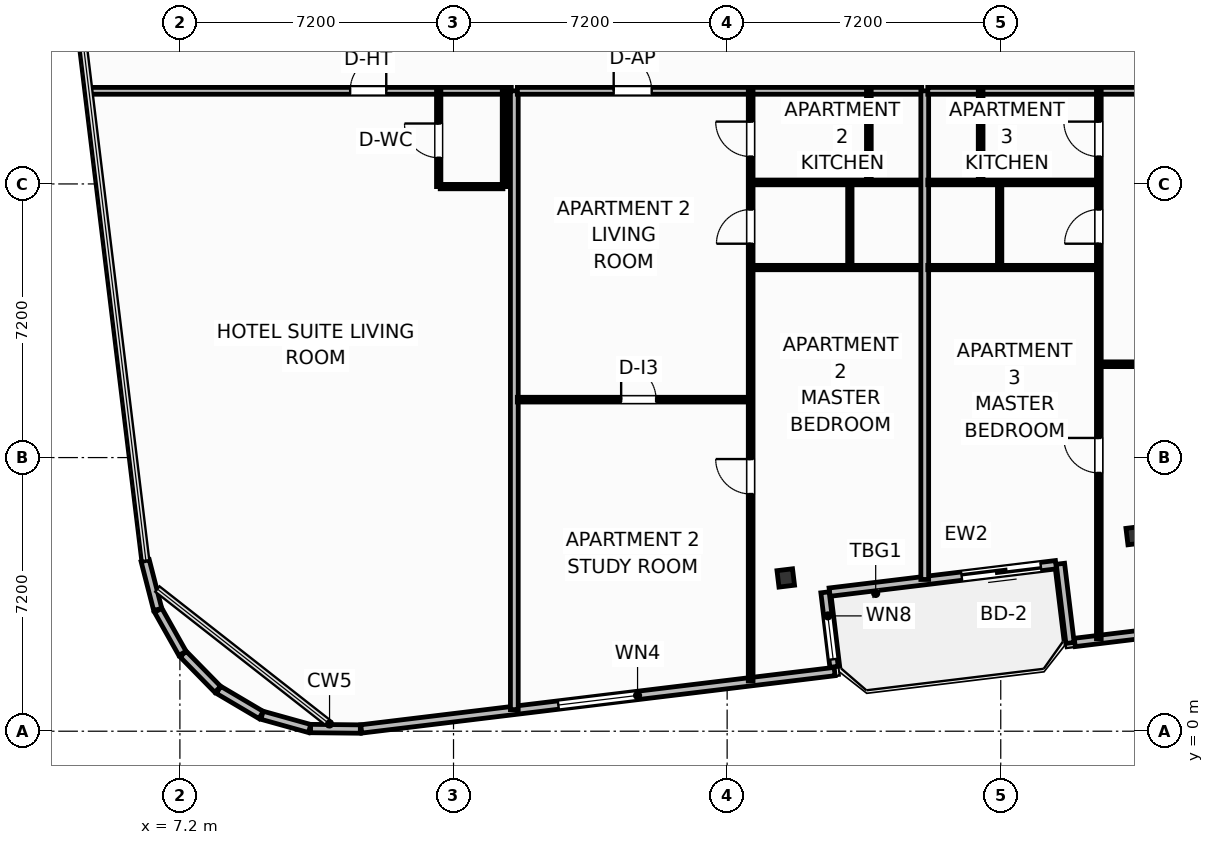
"""IFC4 building model, lengths in metres.
Left out: names, types, materials, properties, quantities, classifications, styles, units other than length and angle.
Written with IfcOpenShell. Run it as: python <this file> out.ifc"""

import sys

from ifc_helpers import new_model, si_unit, direction, frame, frame_2d, origin, origin_2d, place, context, subcontext, project, spatial, rectangle, i_section, extrude, element, fill, save


model = new_model("IFC4")
c1 = context("Model", 3, precision=1e-05, world=origin(), true_north=direction((0.0, 1.0)))
c2 = subcontext(c1, "Body", "Model", "MODEL_VIEW")
j1 = project(units=[si_unit("LENGTHUNIT", "METRE"), si_unit("PLANEANGLEUNIT", "RADIAN")], contexts=[c1])
p1 = place(None, origin())
s1 = spatial("IfcSite", under=j1, at=p1, CompositionType="ELEMENT")
p2 = place(p1, origin())
s2 = spatial("IfcBuilding", under=s1, at=p2, CompositionType="ELEMENT")
p3 = place(p2, frame((0.0, 0.0, 167.2)))
s3 = spatial("IfcBuildingStorey", under=s2, at=p3, CompositionType="ELEMENT", Elevation=167.2)
for number, where, z_axis, x_axis in (
    (1, (23.143, 4.033, 0.0), (0.0, 0.0, 1.0), (0.993, 0.12, 0.0)),
    (2, (32.325, 5.146, 0.0), (0.0, 0.0, 1.0), (0.993, 0.12, 0.0)),
):
    element("IfcColumn", number, at=place(p3, frame(where, z_axis=z_axis, x_axis=x_axis)), inside=s3, PredefinedType="COLUMN", context=c2, shape_type="SweptSolid", body=[
        extrude(i_section(OverallWidth=0.412, OverallDepth=0.435, WebThickness=0.036, FlangeThickness=0.057, FilletRadius=0.025, at=origin_2d()), origin(), (0.0, 0.0, 1.0), 3.7),
    ])
p4 = place(p3, frame((30.252, 4.381, 0.0), z_axis=(0.0, 0.0, 1.0), x_axis=(-0.992735402148, -0.120318000826, 0.0)))
e3 = element("IfcWall", 3, at=p4, inside=s3, PredefinedType="SOLIDWALL", context=c2, shape_type="SweptSolid", body=[
    extrude(rectangle(XDim=6.0, YDim=0.22, at=frame_2d((3.0, 0.0))), origin(), (0.0, 0.0, 1.0), 2.73),
])
p5 = place(p4, frame((0.4, 0.0, 0.0)))
e4 = element("IfcOpeningElement", 4, at=p5, cuts=e3, PredefinedType="OPENING", context=c2, shape_type="SweptSolid", body=[
    extrude(rectangle(XDim=2.1, YDim=2.3, at=frame_2d((1.05, 1.15))), frame((0.0, 0.12, 0.0), z_axis=(0.0, -1.0, 0.0), x_axis=(1.0, 0.0, 0.0)), (0.0, 0.0, 1.0), 0.24),
])
p6 = place(p3, frame((6.286, 4.488, 0.0), z_axis=(0.0, 0.0, 1.0), x_axis=(0.248942347653, -0.968518305219, 0.0)))
e5 = element("IfcWall", 5, at=p6, inside=s3, PredefinedType="SOLIDWALL", context=c2, shape_type="SweptSolid", body=[
    extrude(rectangle(XDim=1.326, YDim=0.22, at=frame_2d((0.663, 0.0))), origin(), (0.0, 0.0, 1.0), 2.73),
])
for number, where, z_axis, x_axis in (
    (6, (6.629, 3.182, 0.0), (0.0, 0.0, 1.0), (0.491, -0.871, 0.0)),
    (7, (7.285, 2.031, 0.0), (0.0, 0.0, 1.0), (0.7, -0.714, 0.0)),
    (8, (8.217, 1.089, 0.0), (0.0, 0.0, 1.0), (0.861, -0.509, 0.0)),
):
    element("IfcWall", number, at=place(p3, frame(where, z_axis=z_axis, x_axis=x_axis)), inside=s3, PredefinedType="SOLIDWALL", context=c2, shape_type="SweptSolid", body=[
        extrude(rectangle(XDim=1.301, YDim=0.22, at=frame_2d((0.65, 0.0))), origin(), (0.0, 0.0, 1.0), 2.73),
    ])
p7 = place(p3, frame((9.361, 0.42, 0.0), z_axis=(0.0, 0.0, 1.0), x_axis=(0.963218895288, -0.268717992997, 0.0)))
e9 = element("IfcWall", 9, at=p7, inside=s3, PredefinedType="SOLIDWALL", context=c2, shape_type="SweptSolid", body=[
    extrude(rectangle(XDim=1.301, YDim=0.22, at=frame_2d((0.65, 0.0))), origin(), (0.0, 0.0, 1.0), 2.73),
])
p8 = place(p3, frame((10.639, 0.07, 0.0), z_axis=(0.0, 0.0, 1.0), x_axis=(0.999947377741, -0.010258740119, 0.0)))
e10 = element("IfcWall", 10, at=p8, inside=s3, PredefinedType="SOLIDWALL", context=c2, shape_type="SweptSolid", body=[
    extrude(rectangle(XDim=1.309, YDim=0.22, at=frame_2d((0.654, 0.0))), origin(), (0.0, 0.0, 1.0), 2.73),
])
p9 = place(p3, frame((11.972, 0.06, 0.0), z_axis=(0.0, 0.0, 1.0), x_axis=(0.992732021049, 0.120345894751, 0.0)))
e11 = element("IfcWall", 11, at=p9, inside=s3, PredefinedType="SOLIDWALL", context=c2, shape_type="SweptSolid", body=[
    extrude(rectangle(XDim=12.547, YDim=0.22, at=frame_2d((6.274, 0.0))), origin(), (0.0, 0.0, 1.0), 2.73),
])
p10 = place(p9, frame((5.224, 0.0, 0.8)))
e12 = element("IfcOpeningElement", 12, at=p10, cuts=e11, PredefinedType="OPENING", context=c2, shape_type="SweptSolid", body=[
    extrude(rectangle(XDim=2.1, YDim=1.75, at=frame_2d((1.05, 0.875))), frame((0.0, 0.12, 0.0), z_axis=(0.0, -1.0, 0.0), x_axis=(1.0, 0.0, 0.0)), (0.0, 0.0, 1.0), 0.24),
])
p11 = place(p3, frame((24.413, 1.694, 0.0), z_axis=(0.0, 0.0, 1.0), x_axis=(-0.120290754542, 0.992738703976, 0.0)))
e13 = element("IfcWall", 13, at=p11, inside=s3, PredefinedType="SOLIDWALL", context=c2, shape_type="SweptSolid", body=[
    extrude(rectangle(XDim=1.975, YDim=0.22, at=frame_2d((0.987, 0.0))), origin(), (0.0, 0.0, 1.0), 2.73),
])
p12 = place(p11, frame((0.2, 0.0, 0.8)))
e14 = element("IfcOpeningElement", 14, at=p12, cuts=e13, PredefinedType="OPENING", context=c2, shape_type="SweptSolid", body=[
    extrude(rectangle(XDim=1.15, YDim=1.4, at=frame_2d((0.575, 0.7))), frame((0.0, 0.12, 0.0), z_axis=(0.0, -1.0, 0.0), x_axis=(1.0, 0.0, 0.0)), (0.0, 0.0, 1.0), 0.24),
])
p13 = place(p3, frame((30.37, 4.406, 0.0), z_axis=(0.0, 0.0, 1.0), x_axis=(0.120327895535, -0.992734202874, 0.0)))
e15 = element("IfcWall", 15, at=p13, inside=s3, PredefinedType="SOLIDWALL", context=c2, shape_type="SweptSolid", body=[
    extrude(rectangle(XDim=2.1, YDim=0.22, at=frame_2d((1.05, 0.0))), origin(), (0.0, 0.0, 1.0), 2.73),
])
p14 = place(p3, frame((30.747, 2.336, 0.0), z_axis=(0.0, 0.0, 1.0), x_axis=(0.992731032022, 0.120354052946, 0.0)))
e16 = element("IfcWall", 16, at=p14, inside=s3, PredefinedType="SOLIDWALL", context=c2, shape_type="SweptSolid", body=[
    extrude(rectangle(XDim=8.035, YDim=0.22, at=frame_2d((4.018, 0.0))), origin(), (0.0, 0.0, 1.0), 2.73),
])
p15 = place(p14, frame((2.968, 0.0, 0.8)))
e17 = element("IfcOpeningElement", 17, at=p15, cuts=e16, PredefinedType="OPENING", context=c2, shape_type="SweptSolid", body=[
    extrude(rectangle(XDim=2.1, YDim=1.75, at=frame_2d((1.05, 0.875))), frame((0.0, 0.12, 0.0), z_axis=(0.0, -1.0, 0.0), x_axis=(1.0, 0.0, 0.0)), (0.0, 0.0, 1.0), 0.24),
])
p16 = place(p3, frame((4.847, 16.85, 0.0), z_axis=(0.0, 0.0, 1.0), x_axis=(1.0, 0.0, 0.0)))
e18 = element("IfcWall", 18, at=p16, inside=s3, PredefinedType="PARTITIONING", context=c2, shape_type="SweptSolid", body=[
    extrude(rectangle(XDim=11.073, YDim=0.18, at=frame_2d((5.537, 0.0))), origin(), (0.0, 0.0, 1.0), 3.45),
])
p17 = place(p16, frame((6.833, 0.0, 0.0)))
e19 = element("IfcOpeningElement", 19, at=p17, cuts=e18, PredefinedType="OPENING", context=c2, shape_type="SweptSolid", body=[
    extrude(rectangle(XDim=0.95, YDim=2.15, at=frame_2d((0.475, 1.075))), frame((0.0, 0.1, 0.0), z_axis=(0.0, -1.0, 0.0), x_axis=(1.0, 0.0, 0.0)), (0.0, 0.0, 1.0), 0.2),
])
p18 = place(p3, frame((14.05, 14.33, 0.0), z_axis=(0.0, 0.0, 1.0), x_axis=(1.0, 0.0, 0.0)))
e20 = element("IfcWall", 20, at=p18, inside=s3, PredefinedType="PARTITIONING", context=c2, shape_type="SweptSolid", body=[
    extrude(rectangle(XDim=1.65, YDim=0.115, at=frame_2d((0.825, 0.0))), origin(), (0.0, 0.0, 1.0), 3.45),
])
p19 = place(p3, frame((14.01, 14.33, 0.0), z_axis=(0.0, 0.0, 1.0), x_axis=(0.0, 1.0, 0.0)))
e21 = element("IfcWall", 21, at=p19, inside=s3, PredefinedType="PARTITIONING", context=c2, shape_type="SweptSolid", body=[
    extrude(rectangle(XDim=2.52, YDim=0.115, at=frame_2d((1.26, 0.0))), origin(), (0.0, 0.0, 1.0), 3.45),
])
p20 = place(p19, frame((0.76, 0.0, 0.0)))
e22 = element("IfcOpeningElement", 22, at=p20, cuts=e21, PredefinedType="OPENING", context=c2, shape_type="SweptSolid", body=[
    extrude(rectangle(XDim=0.9, YDim=2.05, at=frame_2d((0.45, 1.025))), frame((0.0, 0.067, 0.0), z_axis=(0.0, -1.0, 0.0), x_axis=(1.0, 0.0, 0.0)), (0.0, 0.0, 1.0), 0.135),
])
p21 = place(p3, frame((15.74, 14.33, 0.0), z_axis=(0.0, 0.0, 1.0), x_axis=(0.0, 1.0, 0.0)))
e23 = element("IfcWall", 23, at=p21, inside=s3, PredefinedType="PARTITIONING", context=c2, shape_type="SweptSolid", body=[
    extrude(rectangle(XDim=2.52, YDim=0.115, at=frame_2d((1.26, 0.0))), origin(), (0.0, 0.0, 1.0), 3.45),
])
p22 = place(p3, frame((16.0, 0.568, 0.0), z_axis=(0.0, 0.0, 1.0), x_axis=(0.0, 1.0, 0.0)))
e24 = element("IfcWall", 24, at=p22, inside=s3, PredefinedType="PARTITIONING", context=c2, shape_type="SweptSolid", body=[
    extrude(rectangle(XDim=16.282, YDim=0.205, at=frame_2d((8.141, 0.0))), origin(), (0.0, 0.0, 1.0), 3.45),
])
p23 = place(p3, frame((16.08, 8.724, 0.0), z_axis=(0.0, 0.0, 1.0), x_axis=(1.0, 0.0, 0.0)))
e25 = element("IfcWall", 25, at=p23, inside=s3, PredefinedType="PARTITIONING", context=c2, shape_type="SweptSolid", body=[
    extrude(rectangle(XDim=6.069, YDim=0.125, at=frame_2d((3.035, 0.0))), origin(), (0.0, 0.0, 1.0), 3.45),
])
p24 = place(p23, frame((2.731, 0.0, 0.0)))
e26 = element("IfcOpeningElement", 26, at=p24, cuts=e25, PredefinedType="OPENING", context=c2, shape_type="SweptSolid", body=[
    extrude(rectangle(XDim=0.92, YDim=2.05, at=frame_2d((0.46, 1.025))), frame((0.0, 0.073, 0.0), z_axis=(0.0, -1.0, 0.0), x_axis=(1.0, 0.0, 0.0)), (0.0, 0.0, 1.0), 0.145),
])
p25 = place(p3, frame((16.08, 16.85, 0.0), z_axis=(0.0, 0.0, 1.0), x_axis=(1.0, 0.0, 0.0)))
e27 = element("IfcWall", 27, at=p25, inside=s3, PredefinedType="PARTITIONING", context=c2, shape_type="SweptSolid", body=[
    extrude(rectangle(XDim=10.64, YDim=0.18, at=frame_2d((5.32, 0.0))), origin(), (0.0, 0.0, 1.0), 3.45),
])
p26 = place(p25, frame((2.535, 0.0, 0.0)))
e28 = element("IfcOpeningElement", 28, at=p26, cuts=e27, PredefinedType="OPENING", context=c2, shape_type="SweptSolid", body=[
    extrude(rectangle(XDim=1.0, YDim=2.2, at=frame_2d((0.5, 1.1))), frame((0.0, 0.1, 0.0), z_axis=(0.0, -1.0, 0.0), x_axis=(1.0, 0.0, 0.0)), (0.0, 0.0, 1.0), 0.2),
])
p27 = place(p3, frame((22.219, 1.322, 0.0), z_axis=(0.0, 0.0, 1.0), x_axis=(0.0, 1.0, 0.0)))
e29 = element("IfcWall", 29, at=p27, inside=s3, PredefinedType="PARTITIONING", context=c2, shape_type="SweptSolid", body=[
    extrude(rectangle(XDim=15.528, YDim=0.125, at=frame_2d((7.764, 0.0))), origin(), (0.0, 0.0, 1.0), 3.45),
])
p28 = place(p27, frame((4.919, 0.0, 0.0)))
e30 = element("IfcOpeningElement", 30, at=p28, cuts=e29, PredefinedType="OPENING", context=c2, shape_type="SweptSolid", body=[
    extrude(rectangle(XDim=0.92, YDim=2.05, at=frame_2d((0.46, 1.025))), frame((0.0, 0.073, 0.0), z_axis=(0.0, -1.0, 0.0), x_axis=(1.0, 0.0, 0.0)), (0.0, 0.0, 1.0), 0.145),
])
p29 = place(p27, frame((11.505, 0.0, 0.0)))
e31 = element("IfcOpeningElement", 31, at=p29, cuts=e29, PredefinedType="OPENING", context=c2, shape_type="SweptSolid", body=[
    extrude(rectangle(XDim=0.9, YDim=2.05, at=frame_2d((0.45, 1.025))), frame((0.0, 0.073, 0.0), z_axis=(0.0, -1.0, 0.0), x_axis=(1.0, 0.0, 0.0)), (0.0, 0.0, 1.0), 0.145),
])
p30 = place(p27, frame((13.798, 0.0, 0.0)))
e32 = element("IfcOpeningElement", 32, at=p30, cuts=e29, PredefinedType="OPENING", context=c2, shape_type="SweptSolid", body=[
    extrude(rectangle(XDim=0.92, YDim=2.05, at=frame_2d((0.46, 1.025))), frame((0.0, 0.073, 0.0), z_axis=(0.0, -1.0, 0.0), x_axis=(1.0, 0.0, 0.0)), (0.0, 0.0, 1.0), 0.145),
])
p31 = place(p3, frame((22.289, 14.44, 0.0), z_axis=(0.0, 0.0, 1.0), x_axis=(1.0, 0.0, 0.0)))
e33 = element("IfcWall", 33, at=p31, inside=s3, PredefinedType="PARTITIONING", context=c2, shape_type="SweptSolid", body=[
    extrude(rectangle(XDim=4.431, YDim=0.125, at=frame_2d((2.215, 0.0))), origin(), (0.0, 0.0, 1.0), 3.45),
])
p32 = place(p3, frame((22.289, 12.2, 0.0), z_axis=(0.0, 0.0, 1.0), x_axis=(1.0, 0.0, 0.0)))
e34 = element("IfcWall", 34, at=p32, inside=s3, PredefinedType="PARTITIONING", context=c2, shape_type="SweptSolid", body=[
    extrude(rectangle(XDim=4.431, YDim=0.115, at=frame_2d((2.215, 0.0))), origin(), (0.0, 0.0, 1.0), 3.45),
])
p33 = place(p3, frame((25.329, 14.44, 0.0), z_axis=(0.0, 0.0, 1.0), x_axis=(0.0, 1.0, 0.0)))
e35 = element("IfcWall", 35, at=p33, inside=s3, PredefinedType="PARTITIONING", context=c2, shape_type="SweptSolid", body=[
    extrude(rectangle(XDim=2.41, YDim=0.125, at=frame_2d((1.205, 0.0))), origin(), (0.0, 0.0, 1.0), 3.45),
])
p34 = place(p3, frame((24.829, 12.2, 0.0), z_axis=(0.0, 0.0, 1.0), x_axis=(0.0, 1.0, 0.0)))
e36 = element("IfcWall", 36, at=p34, inside=s3, PredefinedType="PARTITIONING", context=c2, shape_type="SweptSolid", body=[
    extrude(rectangle(XDim=2.24, YDim=0.115, at=frame_2d((1.12, 0.0))), origin(), (0.0, 0.0, 1.0), 3.45),
])
p35 = place(p3, frame((26.8, 3.993, 0.0), z_axis=(0.0, 0.0, 1.0), x_axis=(0.0, 1.0, 0.0)))
e37 = element("IfcWall", 37, at=p35, inside=s3, PredefinedType="PARTITIONING", context=c2, shape_type="SweptSolid", body=[
    extrude(rectangle(XDim=12.857, YDim=0.205, at=frame_2d((6.429, 0.0))), origin(), (0.0, 0.0, 1.0), 3.45),
])
p36 = place(p3, frame((31.451, 9.656, 0.0), z_axis=(0.0, 0.0, 1.0), x_axis=(1.0, 0.0, 0.0)))
e38 = element("IfcWall", 38, at=p36, inside=s3, PredefinedType="PARTITIONING", context=c2, shape_type="SweptSolid", body=[
    extrude(rectangle(XDim=6.069, YDim=0.125, at=frame_2d((3.035, 0.0))), origin(), (0.0, 0.0, 1.0), 3.45),
])
p37 = place(p36, frame((2.731, 0.0, 0.0)))
e39 = element("IfcOpeningElement", 39, at=p37, cuts=e38, PredefinedType="OPENING", context=c2, shape_type="SweptSolid", body=[
    extrude(rectangle(XDim=0.92, YDim=2.05, at=frame_2d((0.46, 1.025))), frame((0.0, 0.073, 0.0), z_axis=(0.0, -1.0, 0.0), x_axis=(1.0, 0.0, 0.0)), (0.0, 0.0, 1.0), 0.145),
])
p38 = place(p3, frame((26.88, 16.85, 0.0), z_axis=(0.0, 0.0, 1.0), x_axis=(1.0, 0.0, 0.0)))
e40 = element("IfcWall", 40, at=p38, inside=s3, PredefinedType="PARTITIONING", context=c2, shape_type="SweptSolid", body=[
    extrude(rectangle(XDim=10.64, YDim=0.18, at=frame_2d((5.32, 0.0))), origin(), (0.0, 0.0, 1.0), 3.45),
])
p39 = place(p38, frame((7.105, 0.0, 0.0)))
e41 = element("IfcOpeningElement", 41, at=p39, cuts=e40, PredefinedType="OPENING", context=c2, shape_type="SweptSolid", body=[
    extrude(rectangle(XDim=1.0, YDim=2.2, at=frame_2d((0.5, 1.1))), frame((0.0, 0.1, 0.0), z_axis=(0.0, -1.0, 0.0), x_axis=(1.0, 0.0, 0.0)), (0.0, 0.0, 1.0), 0.2),
])
p40 = place(p3, frame((31.381, 2.433, 0.0), z_axis=(0.0, 0.0, 1.0), x_axis=(0.0, 1.0, 0.0)))
e42 = element("IfcWall", 42, at=p40, inside=s3, PredefinedType="PARTITIONING", context=c2, shape_type="SweptSolid", body=[
    extrude(rectangle(XDim=14.417, YDim=0.125, at=frame_2d((7.208, 0.0))), origin(), (0.0, 0.0, 1.0), 3.45),
])
p41 = place(p40, frame((4.364, 0.0, 0.0)))
e43 = element("IfcOpeningElement", 43, at=p41, cuts=e42, PredefinedType="OPENING", context=c2, shape_type="SweptSolid", body=[
    extrude(rectangle(XDim=0.92, YDim=2.05, at=frame_2d((0.46, 1.025))), frame((0.0, 0.073, 0.0), z_axis=(0.0, -1.0, 0.0), x_axis=(1.0, 0.0, 0.0)), (0.0, 0.0, 1.0), 0.145),
])
p42 = place(p40, frame((10.395, 0.0, 0.0)))
e44 = element("IfcOpeningElement", 44, at=p42, cuts=e42, PredefinedType="OPENING", context=c2, shape_type="SweptSolid", body=[
    extrude(rectangle(XDim=0.9, YDim=2.05, at=frame_2d((0.45, 1.025))), frame((0.0, 0.073, 0.0), z_axis=(0.0, -1.0, 0.0), x_axis=(1.0, 0.0, 0.0)), (0.0, 0.0, 1.0), 0.145),
])
p43 = place(p40, frame((12.687, 0.0, 0.0)))
e45 = element("IfcOpeningElement", 45, at=p43, cuts=e42, PredefinedType="OPENING", context=c2, shape_type="SweptSolid", body=[
    extrude(rectangle(XDim=0.92, YDim=2.05, at=frame_2d((0.46, 1.025))), frame((0.0, 0.073, 0.0), z_axis=(0.0, -1.0, 0.0), x_axis=(1.0, 0.0, 0.0)), (0.0, 0.0, 1.0), 0.145),
])
p44 = place(p3, frame((26.88, 14.44, 0.0), z_axis=(0.0, 0.0, 1.0), x_axis=(1.0, 0.0, 0.0)))
e46 = element("IfcWall", 46, at=p44, inside=s3, PredefinedType="PARTITIONING", context=c2, shape_type="SweptSolid", body=[
    extrude(rectangle(XDim=4.431, YDim=0.125, at=frame_2d((2.215, 0.0))), origin(), (0.0, 0.0, 1.0), 3.45),
])
p45 = place(p3, frame((26.88, 12.2, 0.0), z_axis=(0.0, 0.0, 1.0), x_axis=(1.0, 0.0, 0.0)))
e47 = element("IfcWall", 47, at=p45, inside=s3, PredefinedType="PARTITIONING", context=c2, shape_type="SweptSolid", body=[
    extrude(rectangle(XDim=4.431, YDim=0.115, at=frame_2d((2.215, 0.0))), origin(), (0.0, 0.0, 1.0), 3.45),
])
p46 = place(p3, frame((28.271, 14.44, 0.0), z_axis=(0.0, 0.0, 1.0), x_axis=(0.0, 1.0, 0.0)))
e48 = element("IfcWall", 48, at=p46, inside=s3, PredefinedType="PARTITIONING", context=c2, shape_type="SweptSolid", body=[
    extrude(rectangle(XDim=2.41, YDim=0.125, at=frame_2d((1.205, 0.0))), origin(), (0.0, 0.0, 1.0), 3.45),
])
p47 = place(p3, frame((28.771, 12.2, 0.0), z_axis=(0.0, 0.0, 1.0), x_axis=(0.0, 1.0, 0.0)))
e49 = element("IfcWall", 49, at=p47, inside=s3, PredefinedType="PARTITIONING", context=c2, shape_type="SweptSolid", body=[
    extrude(rectangle(XDim=2.24, YDim=0.115, at=frame_2d((1.12, 0.0))), origin(), (0.0, 0.0, 1.0), 3.45),
])
p48 = place(p5, origin())
e50 = element("IfcDoor", 50, at=p48, inside=s3, OperationType="SLIDING_TO_LEFT", PredefinedType="DOOR", context=c2, shape_type="SweptSolid", body=[
    extrude(rectangle(XDim=2.1, YDim=2.3, at=frame_2d((1.05, 1.15))), frame((0.0, 0.025, 0.0), z_axis=(0.0, -1.0, 0.0), x_axis=(1.0, 0.0, 0.0)), (0.0, 0.0, 1.0), 0.05),
])
fill(e4, e50)
p49 = place(p10, origin())
e51 = element("IfcWindow", 51, at=p49, inside=s3, PartitioningType="SINGLE_PANEL", PredefinedType="WINDOW", context=c2, shape_type="SweptSolid", body=[
    extrude(rectangle(XDim=2.1, YDim=1.75, at=frame_2d((1.05, 0.875))), frame((0.0, 0.03, 0.0), z_axis=(0.0, -1.0, 0.0), x_axis=(1.0, 0.0, 0.0)), (0.0, 0.0, 1.0), 0.06),
])
fill(e12, e51)
p50 = place(p17, origin())
e52 = element("IfcDoor", 52, at=p50, inside=s3, OperationType="SINGLE_SWING_RIGHT", PredefinedType="DOOR", context=c2, shape_type="SweptSolid", body=[
    extrude(rectangle(XDim=0.95, YDim=2.15, at=frame_2d((0.475, 1.075))), frame((0.0, 0.025, 0.0), z_axis=(0.0, -1.0, 0.0), x_axis=(1.0, 0.0, 0.0)), (0.0, 0.0, 1.0), 0.05),
])
fill(e19, e52)
p51 = place(p20, origin())
e53 = element("IfcDoor", 53, at=p51, inside=s3, OperationType="SINGLE_SWING_RIGHT", PredefinedType="DOOR", context=c2, shape_type="SweptSolid", body=[
    extrude(rectangle(XDim=0.9, YDim=2.05, at=frame_2d((0.45, 1.025))), frame((0.0, 0.025, 0.0), z_axis=(0.0, -1.0, 0.0), x_axis=(1.0, 0.0, 0.0)), (0.0, 0.0, 1.0), 0.05),
])
fill(e22, e53)
p52 = place(p24, origin())
e54 = element("IfcDoor", 54, at=p52, inside=s3, OperationType="SINGLE_SWING_LEFT", PredefinedType="DOOR", context=c2, shape_type="SweptSolid", body=[
    extrude(rectangle(XDim=0.92, YDim=2.05, at=frame_2d((0.46, 1.025))), frame((0.0, 0.025, 0.0), z_axis=(0.0, -1.0, 0.0), x_axis=(1.0, 0.0, 0.0)), (0.0, 0.0, 1.0), 0.05),
])
fill(e26, e54)
p53 = place(p26, origin())
e55 = element("IfcDoor", 55, at=p53, inside=s3, OperationType="SINGLE_SWING_LEFT", PredefinedType="DOOR", context=c2, shape_type="SweptSolid", body=[
    extrude(rectangle(XDim=1.0, YDim=2.2, at=frame_2d((0.5, 1.1))), frame((0.0, 0.025, 0.0), z_axis=(0.0, -1.0, 0.0), x_axis=(1.0, 0.0, 0.0)), (0.0, 0.0, 1.0), 0.05),
])
fill(e28, e55)
p54 = place(p28, origin())
e56 = element("IfcDoor", 56, at=p54, inside=s3, OperationType="SINGLE_SWING_RIGHT", PredefinedType="DOOR", context=c2, shape_type="SweptSolid", body=[
    extrude(rectangle(XDim=0.92, YDim=2.05, at=frame_2d((0.46, 1.025))), frame((0.0, 0.025, 0.0), z_axis=(0.0, -1.0, 0.0), x_axis=(1.0, 0.0, 0.0)), (0.0, 0.0, 1.0), 0.05),
])
fill(e30, e56)
p55 = place(p29, origin())
e57 = element("IfcDoor", 57, at=p55, inside=s3, OperationType="SINGLE_SWING_LEFT", PredefinedType="DOOR", context=c2, shape_type="SweptSolid", body=[
    extrude(rectangle(XDim=0.9, YDim=2.05, at=frame_2d((0.45, 1.025))), frame((0.0, 0.025, 0.0), z_axis=(0.0, -1.0, 0.0), x_axis=(1.0, 0.0, 0.0)), (0.0, 0.0, 1.0), 0.05),
])
fill(e31, e57)
p56 = place(p30, origin())
e58 = element("IfcDoor", 58, at=p56, inside=s3, OperationType="SINGLE_SWING_RIGHT", PredefinedType="DOOR", context=c2, shape_type="SweptSolid", body=[
    extrude(rectangle(XDim=0.92, YDim=2.05, at=frame_2d((0.46, 1.025))), frame((0.0, 0.025, 0.0), z_axis=(0.0, -1.0, 0.0), x_axis=(1.0, 0.0, 0.0)), (0.0, 0.0, 1.0), 0.05),
])
fill(e32, e58)
p57 = place(p41, origin())
e59 = element("IfcDoor", 59, at=p57, inside=s3, OperationType="SINGLE_SWING_RIGHT", PredefinedType="DOOR", context=c2, shape_type="SweptSolid", body=[
    extrude(rectangle(XDim=0.92, YDim=2.05, at=frame_2d((0.46, 1.025))), frame((0.0, 0.025, 0.0), z_axis=(0.0, -1.0, 0.0), x_axis=(1.0, 0.0, 0.0)), (0.0, 0.0, 1.0), 0.05),
])
fill(e43, e59)
p58 = place(p42, origin())
e60 = element("IfcDoor", 60, at=p58, inside=s3, OperationType="SINGLE_SWING_LEFT", PredefinedType="DOOR", context=c2, shape_type="SweptSolid", body=[
    extrude(rectangle(XDim=0.9, YDim=2.05, at=frame_2d((0.45, 1.025))), frame((0.0, 0.025, 0.0), z_axis=(0.0, -1.0, 0.0), x_axis=(1.0, 0.0, 0.0)), (0.0, 0.0, 1.0), 0.05),
])
fill(e44, e60)
p59 = place(p43, origin())
e61 = element("IfcDoor", 61, at=p59, inside=s3, OperationType="SINGLE_SWING_RIGHT", PredefinedType="DOOR", context=c2, shape_type="SweptSolid", body=[
    extrude(rectangle(XDim=0.92, YDim=2.05, at=frame_2d((0.46, 1.025))), frame((0.0, 0.025, 0.0), z_axis=(0.0, -1.0, 0.0), x_axis=(1.0, 0.0, 0.0)), (0.0, 0.0, 1.0), 0.05),
])
fill(e45, e61)
p60 = place(p12, origin())
e62 = element("IfcWindow", 62, at=p60, inside=s3, PartitioningType="SINGLE_PANEL", PredefinedType="WINDOW", context=c2, shape_type="SweptSolid", body=[
    extrude(rectangle(XDim=1.15, YDim=1.4, at=frame_2d((0.575, 0.7))), frame((0.0, 0.03, 0.0), z_axis=(0.0, -1.0, 0.0), x_axis=(1.0, 0.0, 0.0)), (0.0, 0.0, 1.0), 0.06),
])
fill(e14, e62)
save(model, sys.argv[1])
